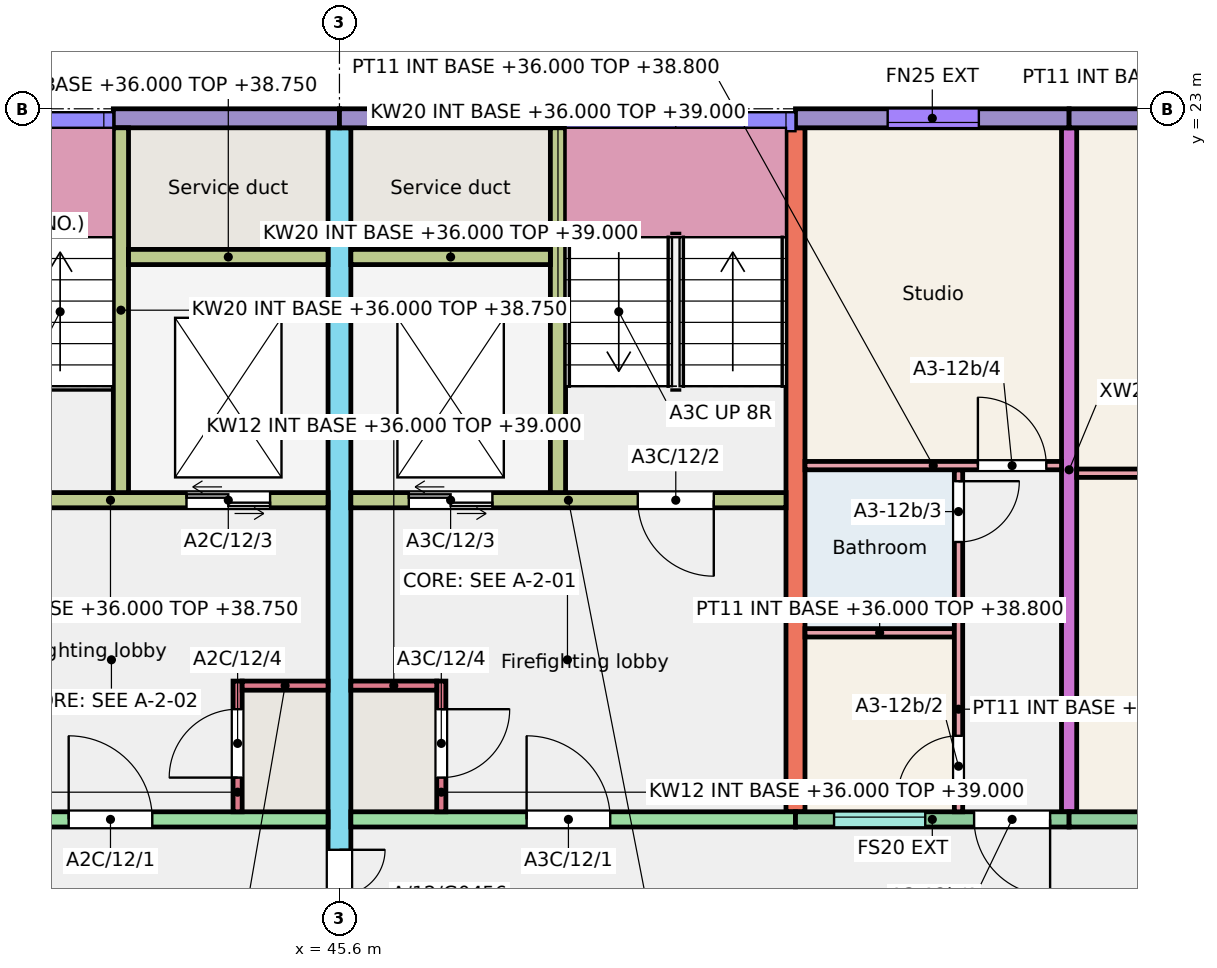
"""IFC4 building model, lengths in metres.
Left out: names, types, materials, properties, quantities, classifications, styles, units other than length and angle.
Written with IfcOpenShell. Run it as: python <this file> out.ifc"""

import sys

from ifc_helpers import new_model, si_unit, direction, frame, frame_2d, origin, place, context, subcontext, project, spatial, rectangle, extrude, element, fill, save


model = new_model("IFC4")
c1 = context("Model", 3, precision=1e-05, world=origin(), true_north=direction((0.0, 1.0)))
c2 = subcontext(c1, "Body", "Model", "MODEL_VIEW")
j1 = project(units=[si_unit("LENGTHUNIT", "METRE"), si_unit("PLANEANGLEUNIT", "RADIAN")], contexts=[c1])
p1 = place(None, origin())
s1 = spatial("IfcSite", under=j1, at=p1, CompositionType="ELEMENT")
p2 = place(p1, origin())
s2 = spatial("IfcBuilding", under=s1, at=p2, CompositionType="ELEMENT")
p3 = place(p2, frame((0.0, 0.0, 36.0)))
s3 = spatial("IfcBuildingStorey", under=s2, at=p3, CompositionType="ELEMENT", Elevation=36.0)
p4 = place(p3, frame((45.6, 11.75, 0.0), z_axis=(0.0, 0.0, 1.0), x_axis=(0.0, 1.0, 0.0)))
e1 = element("IfcWall", 1, at=p4, inside=s3, PredefinedType="SHEAR", context=c2, shape_type="SweptSolid", body=[
    extrude(rectangle(XDim=11.0, YDim=0.3, at=frame_2d((5.5, 0.0))), origin(), (0.0, 0.0, 1.0), 3.0),
])
p5 = place(p4, frame((0.3, 0.0, 0.0)))
e2 = element("IfcOpeningElement", 2, at=p5, cuts=e1, PredefinedType="OPENING", context=c2, shape_type="SweptSolid", body=[
    extrude(rectangle(XDim=1.2, YDim=2.1, at=frame_2d((0.6, 1.05))), frame((0.0, 0.16, 0.0), z_axis=(0.0, -1.0, 0.0), x_axis=(1.0, 0.0, 0.0)), (0.0, 0.0, 1.0), 0.32),
])
p6 = place(p3, frame((51.6, 13.75, 0.0), z_axis=(0.0, 0.0, 1.0), x_axis=(0.0, 1.0, 0.0)))
e3 = element("IfcWall", 3, at=p6, inside=s3, PredefinedType="SHEAR", context=c2, shape_type="SweptSolid", body=[
    extrude(rectangle(XDim=9.0, YDim=0.25, at=frame_2d((4.5, 0.0))), origin(), (0.0, 0.0, 1.0), 3.0),
])
p7 = place(p3, frame((55.2, 13.75, 0.0), z_axis=(0.0, 0.0, 1.0), x_axis=(0.0, 1.0, 0.0)))
e4 = element("IfcWall", 4, at=p7, inside=s3, PredefinedType="SHEAR", context=c2, shape_type="SweptSolid", body=[
    extrude(rectangle(XDim=9.0, YDim=0.2, at=frame_2d((4.5, 0.0))), origin(), (0.0, 0.0, 1.0), 3.0),
])
p8 = place(p3, frame((42.625, 22.875, 0.0), z_axis=(0.0, 0.0, 1.0), x_axis=(1.0, 0.0, 0.0)))
e5 = element("IfcWall", 5, at=p8, inside=s3, PredefinedType="SOLIDWALL", context=c2, shape_type="SweptSolid", body=[
    extrude(rectangle(XDim=2.975, YDim=0.25, at=frame_2d((1.488, 0.0))), origin(), (0.0, 0.0, 1.0), 3.0),
])
p9 = place(p3, frame((39.6, 13.65, 0.0), z_axis=(0.0, 0.0, 1.0), x_axis=(1.0, 0.0, 0.0)))
e6 = element("IfcWall", 6, at=p9, inside=s3, PredefinedType="SHEAR", context=c2, shape_type="SweptSolid", body=[
    extrude(rectangle(XDim=5.85, YDim=0.2, at=frame_2d((2.925, 0.0))), origin(), (0.0, 0.0, 1.0), 2.75),
])
p10 = place(p9, frame((2.438, 0.0, 0.0)))
e7 = element("IfcOpeningElement", 7, at=p10, cuts=e6, PredefinedType="OPENING", context=c2, shape_type="SweptSolid", body=[
    extrude(rectangle(XDim=1.1, YDim=2.1, at=frame_2d((0.55, 1.05))), frame((0.0, 0.11, 0.0), z_axis=(0.0, -1.0, 0.0), x_axis=(1.0, 0.0, 0.0)), (0.0, 0.0, 1.0), 0.22),
])
p11 = place(p3, frame((39.725, 17.85, 0.0), z_axis=(0.0, 0.0, 1.0), x_axis=(1.0, 0.0, 0.0)))
e8 = element("IfcWall", 8, at=p11, inside=s3, PredefinedType="SHEAR", context=c2, shape_type="SweptSolid", body=[
    extrude(rectangle(XDim=5.725, YDim=0.2, at=frame_2d((2.862, 0.0))), origin(), (0.0, 0.0, 1.0), 2.75),
])
p12 = place(p11, frame((0.95, 0.0, 0.0)))
e9 = element("IfcOpeningElement", 9, at=p12, cuts=e8, PredefinedType="OPENING", context=c2, shape_type="SweptSolid", body=[
    extrude(rectangle(XDim=1.0, YDim=2.1, at=frame_2d((0.5, 1.05))), frame((0.0, 0.11, 0.0), z_axis=(0.0, -1.0, 0.0), x_axis=(1.0, 0.0, 0.0)), (0.0, 0.0, 1.0), 0.22),
])
p13 = place(p11, frame((3.863, 0.0, 0.0)))
e10 = element("IfcOpeningElement", 10, at=p13, cuts=e8, PredefinedType="OPENING", context=c2, shape_type="SweptSolid", body=[
    extrude(rectangle(XDim=1.1, YDim=2.1, at=frame_2d((0.55, 1.05))), frame((0.0, 0.11, 0.0), z_axis=(0.0, -1.0, 0.0), x_axis=(1.0, 0.0, 0.0)), (0.0, 0.0, 1.0), 0.22),
])
p14 = place(p3, frame((42.725, 17.95, 0.0), z_axis=(0.0, 0.0, 1.0), x_axis=(0.0, 1.0, 0.0)))
e11 = element("IfcWall", 11, at=p14, inside=s3, PredefinedType="SHEAR", context=c2, shape_type="SweptSolid", body=[
    extrude(rectangle(XDim=4.8, YDim=0.2, at=frame_2d((2.4, 0.0))), origin(), (0.0, 0.0, 1.0), 2.75),
])
p15 = place(p3, frame((42.825, 21.05, 0.0), z_axis=(0.0, 0.0, 1.0), x_axis=(1.0, 0.0, 0.0)))
e12 = element("IfcWall", 12, at=p15, inside=s3, PredefinedType="SHEAR", context=c2, shape_type="SweptSolid", body=[
    extrude(rectangle(XDim=2.625, YDim=0.2, at=frame_2d((1.312, 0.0))), origin(), (0.0, 0.0, 1.0), 2.75),
])
p16 = place(p3, frame((44.26, 13.75, 0.0), z_axis=(0.0, 0.0, 1.0), x_axis=(0.0, 1.0, 0.0)))
e13 = element("IfcWall", 13, at=p16, inside=s3, PredefinedType="SHEAR", context=c2, shape_type="SweptSolid", body=[
    extrude(rectangle(XDim=1.72, YDim=0.12, at=frame_2d((0.86, 0.0))), origin(), (0.0, 0.0, 1.0), 2.75),
])
p17 = place(p16, frame((0.45, 0.0, 0.0)))
e14 = element("IfcOpeningElement", 14, at=p17, cuts=e13, PredefinedType="OPENING", context=c2, shape_type="SweptSolid", body=[
    extrude(rectangle(XDim=0.9, YDim=2.1, at=frame_2d((0.45, 1.05))), frame((0.0, 0.07, 0.0), z_axis=(0.0, -1.0, 0.0), x_axis=(1.0, 0.0, 0.0)), (0.0, 0.0, 1.0), 0.14),
])
p18 = place(p3, frame((44.32, 15.41, 0.0), z_axis=(0.0, 0.0, 1.0), x_axis=(1.0, 0.0, 0.0)))
e15 = element("IfcWall", 15, at=p18, inside=s3, PredefinedType="SHEAR", context=c2, shape_type="SweptSolid", body=[
    extrude(rectangle(XDim=1.13, YDim=0.12, at=frame_2d((0.565, 0.0))), origin(), (0.0, 0.0, 1.0), 2.75),
])
p19 = place(p3, frame((45.6, 22.875, 0.0), z_axis=(0.0, 0.0, 1.0), x_axis=(1.0, 0.0, 0.0)))
e16 = element("IfcWall", 16, at=p19, inside=s3, PredefinedType="SOLIDWALL", context=c2, shape_type="SweptSolid", body=[
    extrude(rectangle(XDim=2.975, YDim=0.25, at=frame_2d((1.487, 0.0))), origin(), (0.0, 0.0, 1.0), 3.0),
])
p20 = place(p3, frame((45.75, 13.65, 0.0), z_axis=(0.0, 0.0, 1.0), x_axis=(1.0, 0.0, 0.0)))
e17 = element("IfcWall", 17, at=p20, inside=s3, PredefinedType="SHEAR", context=c2, shape_type="SweptSolid", body=[
    extrude(rectangle(XDim=5.85, YDim=0.2, at=frame_2d((2.925, 0.0))), origin(), (0.0, 0.0, 1.0), 3.0),
])
p21 = place(p20, frame((2.312, 0.0, 0.0)))
e18 = element("IfcOpeningElement", 18, at=p21, cuts=e17, PredefinedType="OPENING", context=c2, shape_type="SweptSolid", body=[
    extrude(rectangle(XDim=1.1, YDim=2.1, at=frame_2d((0.55, 1.05))), frame((0.0, 0.11, 0.0), z_axis=(0.0, -1.0, 0.0), x_axis=(1.0, 0.0, 0.0)), (0.0, 0.0, 1.0), 0.22),
])
p22 = place(p3, frame((45.75, 17.85, 0.0), z_axis=(0.0, 0.0, 1.0), x_axis=(1.0, 0.0, 0.0)))
e19 = element("IfcWall", 19, at=p22, inside=s3, PredefinedType="SHEAR", context=c2, shape_type="SweptSolid", body=[
    extrude(rectangle(XDim=5.725, YDim=0.2, at=frame_2d((2.863, 0.0))), origin(), (0.0, 0.0, 1.0), 3.0),
])
p23 = place(p22, frame((3.775, 0.0, 0.0)))
e20 = element("IfcOpeningElement", 20, at=p23, cuts=e19, PredefinedType="OPENING", context=c2, shape_type="SweptSolid", body=[
    extrude(rectangle(XDim=1.0, YDim=2.1, at=frame_2d((0.5, 1.05))), frame((0.0, 0.11, 0.0), z_axis=(0.0, -1.0, 0.0), x_axis=(1.0, 0.0, 0.0)), (0.0, 0.0, 1.0), 0.22),
])
p24 = place(p22, frame((0.762, 0.0, 0.0)))
e21 = element("IfcOpeningElement", 21, at=p24, cuts=e19, PredefinedType="OPENING", context=c2, shape_type="SweptSolid", body=[
    extrude(rectangle(XDim=1.1, YDim=2.1, at=frame_2d((0.55, 1.05))), frame((0.0, 0.11, 0.0), z_axis=(0.0, -1.0, 0.0), x_axis=(1.0, 0.0, 0.0)), (0.0, 0.0, 1.0), 0.22),
])
p25 = place(p3, frame((48.475, 17.95, 0.0), z_axis=(0.0, 0.0, 1.0), x_axis=(0.0, 1.0, 0.0)))
e22 = element("IfcWall", 22, at=p25, inside=s3, PredefinedType="SHEAR", context=c2, shape_type="SweptSolid", body=[
    extrude(rectangle(XDim=4.8, YDim=0.2, at=frame_2d((2.4, 0.0))), origin(), (0.0, 0.0, 1.0), 3.0),
])
p26 = place(p3, frame((45.75, 21.05, 0.0), z_axis=(0.0, 0.0, 1.0), x_axis=(1.0, 0.0, 0.0)))
e23 = element("IfcWall", 23, at=p26, inside=s3, PredefinedType="SHEAR", context=c2, shape_type="SweptSolid", body=[
    extrude(rectangle(XDim=2.625, YDim=0.2, at=frame_2d((1.312, 0.0))), origin(), (0.0, 0.0, 1.0), 3.0),
])
p27 = place(p3, frame((46.94, 13.75, 0.0), z_axis=(0.0, 0.0, 1.0), x_axis=(0.0, 1.0, 0.0)))
e24 = element("IfcWall", 24, at=p27, inside=s3, PredefinedType="SHEAR", context=c2, shape_type="SweptSolid", body=[
    extrude(rectangle(XDim=1.72, YDim=0.12, at=frame_2d((0.86, 0.0))), origin(), (0.0, 0.0, 1.0), 3.0),
])
p28 = place(p27, frame((0.45, 0.0, 0.0)))
e25 = element("IfcOpeningElement", 25, at=p28, cuts=e24, PredefinedType="OPENING", context=c2, shape_type="SweptSolid", body=[
    extrude(rectangle(XDim=0.9, YDim=2.1, at=frame_2d((0.45, 1.05))), frame((0.0, 0.07, 0.0), z_axis=(0.0, -1.0, 0.0), x_axis=(1.0, 0.0, 0.0)), (0.0, 0.0, 1.0), 0.14),
])
p29 = place(p3, frame((45.75, 15.41, 0.0), z_axis=(0.0, 0.0, 1.0), x_axis=(1.0, 0.0, 0.0)))
e26 = element("IfcWall", 26, at=p29, inside=s3, PredefinedType="SHEAR", context=c2, shape_type="SweptSolid", body=[
    extrude(rectangle(XDim=1.13, YDim=0.12, at=frame_2d((0.565, 0.0))), origin(), (0.0, 0.0, 1.0), 3.0),
])
p30 = place(p3, frame((51.6, 22.875, 0.0), z_axis=(0.0, 0.0, 1.0), x_axis=(1.0, 0.0, 0.0)))
e27 = element("IfcWall", 27, at=p30, inside=s3, PredefinedType="SOLIDWALL", context=c2, shape_type="SweptSolid", body=[
    extrude(rectangle(XDim=3.6, YDim=0.25, at=frame_2d((1.8, 0.0))), origin(), (0.0, 0.0, 1.0), 3.0),
])
p31 = place(p30, frame((1.212, 0.0, 0.8)))
e28 = element("IfcOpeningElement", 28, at=p31, cuts=e27, PredefinedType="OPENING", context=c2, shape_type="SweptSolid", body=[
    extrude(rectangle(XDim=1.2, YDim=1.6, at=frame_2d((0.6, 0.8))), frame((0.0, 0.135, 0.0), z_axis=(0.0, -1.0, 0.0), x_axis=(1.0, 0.0, 0.0)), (0.0, 0.0, 1.0), 0.27),
])
p32 = place(p3, frame((51.6, 13.65, 0.0), z_axis=(0.0, 0.0, 1.0), x_axis=(1.0, 0.0, 0.0)))
e29 = element("IfcWall", 29, at=p32, inside=s3, PredefinedType="SOLIDWALL", context=c2, shape_type="SweptSolid", body=[
    extrude(rectangle(XDim=3.6, YDim=0.2, at=frame_2d((1.8, 0.0))), origin(), (0.0, 0.0, 1.0), 3.0),
])
p33 = place(p32, frame((0.508, 0.0, 1.1)))
e30 = element("IfcOpeningElement", 30, at=p33, cuts=e29, PredefinedType="OPENING", context=c2, shape_type="SweptSolid", body=[
    extrude(rectangle(XDim=1.2, YDim=1.3, at=frame_2d((0.6, 0.65))), frame((0.0, 0.11, 0.0), z_axis=(0.0, -1.0, 0.0), x_axis=(1.0, 0.0, 0.0)), (0.0, 0.0, 1.0), 0.22),
])
p34 = place(p32, frame((2.35, 0.0, 0.0)))
e31 = element("IfcOpeningElement", 31, at=p34, cuts=e29, PredefinedType="OPENING", context=c2, shape_type="SweptSolid", body=[
    extrude(rectangle(XDim=1.0, YDim=2.1, at=frame_2d((0.5, 1.05))), frame((0.0, 0.11, 0.0), z_axis=(0.0, -1.0, 0.0), x_axis=(1.0, 0.0, 0.0)), (0.0, 0.0, 1.0), 0.22),
])
p35 = place(p3, frame((55.2, 22.875, 0.0), z_axis=(0.0, 0.0, 1.0), x_axis=(1.0, 0.0, 0.0)))
e32 = element("IfcWall", 32, at=p35, inside=s3, PredefinedType="SOLIDWALL", context=c2, shape_type="SweptSolid", body=[
    extrude(rectangle(XDim=3.6, YDim=0.25, at=frame_2d((1.8, 0.0))), origin(), (0.0, 0.0, 1.0), 3.0),
])
p36 = place(p35, frame((1.2, 0.0, 0.8)))
e33 = element("IfcOpeningElement", 33, at=p36, cuts=e32, PredefinedType="OPENING", context=c2, shape_type="SweptSolid", body=[
    extrude(rectangle(XDim=1.2, YDim=1.6, at=frame_2d((0.6, 0.8))), frame((0.0, 0.135, 0.0), z_axis=(0.0, -1.0, 0.0), x_axis=(1.0, 0.0, 0.0)), (0.0, 0.0, 1.0), 0.27),
])
p37 = place(p3, frame((55.2, 13.65, 0.0), z_axis=(0.0, 0.0, 1.0), x_axis=(1.0, 0.0, 0.0)))
e34 = element("IfcWall", 34, at=p37, inside=s3, PredefinedType="SOLIDWALL", context=c2, shape_type="SweptSolid", body=[
    extrude(rectangle(XDim=3.6, YDim=0.2, at=frame_2d((1.8, 0.0))), origin(), (0.0, 0.0, 1.0), 3.0),
])
p38 = place(p37, frame((1.2, 0.0, 0.8)))
e35 = element("IfcOpeningElement", 35, at=p38, cuts=e34, PredefinedType="OPENING", context=c2, shape_type="SweptSolid", body=[
    extrude(rectangle(XDim=1.2, YDim=1.6, at=frame_2d((0.6, 0.8))), frame((0.0, 0.11, 0.0), z_axis=(0.0, -1.0, 0.0), x_axis=(1.0, 0.0, 0.0)), (0.0, 0.0, 1.0), 0.22),
])
p39 = place(p3, frame((55.3, 18.205, 0.0), z_axis=(0.0, 0.0, 1.0), x_axis=(1.0, 0.0, 0.0)))
e36 = element("IfcWall", 36, at=p39, inside=s3, PredefinedType="PARTITIONING", context=c2, shape_type="SweptSolid", body=[
    extrude(rectangle(XDim=3.4, YDim=0.11, at=frame_2d((1.7, 0.0))), origin(), (0.0, 0.0, 1.0), 2.8),
])
p40 = place(p3, frame((51.725, 16.105, 0.0), z_axis=(0.0, 0.0, 1.0), x_axis=(1.0, 0.0, 0.0)))
e37 = element("IfcWall", 37, at=p40, inside=s3, PredefinedType="PARTITIONING", context=c2, shape_type="SweptSolid", body=[
    extrude(rectangle(XDim=1.965, YDim=0.11, at=frame_2d((0.982, 0.0))), origin(), (0.0, 0.0, 1.0), 2.8),
])
p41 = place(p3, frame((53.745, 13.75, 0.0), z_axis=(0.0, 0.0, 1.0), x_axis=(0.0, 1.0, 0.0)))
e38 = element("IfcWall", 38, at=p41, inside=s3, PredefinedType="PARTITIONING", context=c2, shape_type="SweptSolid", body=[
    extrude(rectangle(XDim=4.5, YDim=0.11, at=frame_2d((2.25, 0.0))), origin(), (0.0, 0.0, 1.0), 2.8),
])
p42 = place(p41, frame((0.2, 0.0, 0.0)))
e39 = element("IfcOpeningElement", 39, at=p42, cuts=e38, PredefinedType="OPENING", context=c2, shape_type="SweptSolid", body=[
    extrude(rectangle(XDim=0.8, YDim=2.1, at=frame_2d((0.4, 1.05))), frame((0.0, 0.065, 0.0), z_axis=(0.0, -1.0, 0.0), x_axis=(1.0, 0.0, 0.0)), (0.0, 0.0, 1.0), 0.13),
])
p43 = place(p41, frame((3.55, 0.0, 0.0)))
e40 = element("IfcOpeningElement", 40, at=p43, cuts=e38, PredefinedType="OPENING", context=c2, shape_type="SweptSolid", body=[
    extrude(rectangle(XDim=0.8, YDim=2.1, at=frame_2d((0.4, 1.05))), frame((0.0, 0.065, 0.0), z_axis=(0.0, -1.0, 0.0), x_axis=(1.0, 0.0, 0.0)), (0.0, 0.0, 1.0), 0.13),
])
p44 = place(p3, frame((51.725, 18.305, 0.0), z_axis=(0.0, 0.0, 1.0), x_axis=(1.0, 0.0, 0.0)))
e41 = element("IfcWall", 41, at=p44, inside=s3, PredefinedType="PARTITIONING", context=c2, shape_type="SweptSolid", body=[
    extrude(rectangle(XDim=3.375, YDim=0.11, at=frame_2d((1.688, 0.0))), origin(), (0.0, 0.0, 1.0), 2.8),
])
p45 = place(p44, frame((2.275, 0.0, 0.0)))
e42 = element("IfcOpeningElement", 42, at=p45, cuts=e41, PredefinedType="OPENING", context=c2, shape_type="SweptSolid", body=[
    extrude(rectangle(XDim=0.9, YDim=2.1, at=frame_2d((0.45, 1.05))), frame((0.0, 0.065, 0.0), z_axis=(0.0, -1.0, 0.0), x_axis=(1.0, 0.0, 0.0)), (0.0, 0.0, 1.0), 0.13),
])
p46 = place(p33, origin())
e43 = element("IfcWindow", 43, at=p46, inside=s3, PartitioningType="SINGLE_PANEL", PredefinedType="WINDOW", context=c2, shape_type="SweptSolid", body=[
    extrude(rectangle(XDim=1.2, YDim=1.3, at=frame_2d((0.6, 0.65))), frame((0.0, 0.06, 0.0), z_axis=(0.0, -1.0, 0.0), x_axis=(1.0, 0.0, 0.0)), (0.0, 0.0, 1.0), 0.06),
])
fill(e30, e43)
p47 = place(p31, origin())
e44 = element("IfcWindow", 44, at=p47, inside=s3, PartitioningType="SINGLE_PANEL", PredefinedType="WINDOW", context=c2, shape_type="SweptSolid", body=[
    extrude(rectangle(XDim=1.2, YDim=1.6, at=frame_2d((0.6, 0.8))), frame((0.0, -0.025, 0.0), z_axis=(0.0, -1.0, 0.0), x_axis=(1.0, 0.0, 0.0)), (0.0, 0.0, 1.0), 0.06),
])
fill(e28, e44)
p48 = place(p34, origin())
e45 = element("IfcDoor", 45, at=p48, inside=s3, OperationType="SINGLE_SWING_RIGHT", PredefinedType="DOOR", context=c2, shape_type="SweptSolid", body=[
    extrude(rectangle(XDim=1.0, YDim=2.1, at=frame_2d((0.5, 1.05))), frame((0.0, 0.025, 0.0), z_axis=(0.0, -1.0, 0.0), x_axis=(1.0, 0.0, 0.0)), (0.0, 0.0, 1.0), 0.05),
])
fill(e31, e45)
p49 = place(p42, origin())
e46 = element("IfcDoor", 46, at=p49, inside=s3, OperationType="SINGLE_SWING_LEFT", PredefinedType="DOOR", context=c2, shape_type="SweptSolid", body=[
    extrude(rectangle(XDim=0.8, YDim=2.1, at=frame_2d((0.4, 1.05))), frame((0.0, 0.025, 0.0), z_axis=(0.0, -1.0, 0.0), x_axis=(1.0, 0.0, 0.0)), (0.0, 0.0, 1.0), 0.05),
])
fill(e39, e46)
p50 = place(p43, origin())
e47 = element("IfcDoor", 47, at=p50, inside=s3, OperationType="SINGLE_SWING_RIGHT", PredefinedType="DOOR", context=c2, shape_type="SweptSolid", body=[
    extrude(rectangle(XDim=0.8, YDim=2.1, at=frame_2d((0.4, 1.05))), frame((0.0, 0.025, 0.0), z_axis=(0.0, -1.0, 0.0), x_axis=(1.0, 0.0, 0.0)), (0.0, 0.0, 1.0), 0.05),
])
fill(e40, e47)
p51 = place(p45, origin())
e48 = element("IfcDoor", 48, at=p51, inside=s3, OperationType="SINGLE_SWING_LEFT", PredefinedType="DOOR", context=c2, shape_type="SweptSolid", body=[
    extrude(rectangle(XDim=0.9, YDim=2.1, at=frame_2d((0.45, 1.05))), frame((0.0, 0.025, 0.0), z_axis=(0.0, -1.0, 0.0), x_axis=(1.0, 0.0, 0.0)), (0.0, 0.0, 1.0), 0.05),
])
fill(e42, e48)
p52 = place(p10, origin())
e49 = element("IfcDoor", 49, at=p52, inside=s3, OperationType="SINGLE_SWING_LEFT", PredefinedType="DOOR", context=c2, shape_type="SweptSolid", body=[
    extrude(rectangle(XDim=1.1, YDim=2.1, at=frame_2d((0.55, 1.05))), frame((0.0, 0.025, 0.0), z_axis=(0.0, -1.0, 0.0), x_axis=(1.0, 0.0, 0.0)), (0.0, 0.0, 1.0), 0.05),
])
fill(e7, e49)
p53 = place(p13, origin())
e50 = element("IfcDoor", 50, at=p53, inside=s3, OperationType="DOUBLE_DOOR_SLIDING", PredefinedType="DOOR", context=c2, shape_type="SweptSolid", body=[
    extrude(rectangle(XDim=1.1, YDim=2.1, at=frame_2d((0.55, 1.05))), frame((0.0, 0.025, 0.0), z_axis=(0.0, -1.0, 0.0), x_axis=(1.0, 0.0, 0.0)), (0.0, 0.0, 1.0), 0.05),
])
fill(e10, e50)
p54 = place(p17, origin())
e51 = element("IfcDoor", 51, at=p54, inside=s3, OperationType="SINGLE_SWING_LEFT", PredefinedType="DOOR", context=c2, shape_type="SweptSolid", body=[
    extrude(rectangle(XDim=0.9, YDim=2.1, at=frame_2d((0.45, 1.05))), frame((0.0, 0.025, 0.0), z_axis=(0.0, -1.0, 0.0), x_axis=(1.0, 0.0, 0.0)), (0.0, 0.0, 1.0), 0.05),
])
fill(e14, e51)
p55 = place(p21, origin())
e52 = element("IfcDoor", 52, at=p55, inside=s3, OperationType="SINGLE_SWING_LEFT", PredefinedType="DOOR", context=c2, shape_type="SweptSolid", body=[
    extrude(rectangle(XDim=1.1, YDim=2.1, at=frame_2d((0.55, 1.05))), frame((0.0, 0.025, 0.0), z_axis=(0.0, -1.0, 0.0), x_axis=(1.0, 0.0, 0.0)), (0.0, 0.0, 1.0), 0.05),
])
fill(e18, e52)
p56 = place(p23, origin())
e53 = element("IfcDoor", 53, at=p56, inside=s3, OperationType="SINGLE_SWING_RIGHT", PredefinedType="DOOR", context=c2, shape_type="SweptSolid", body=[
    extrude(rectangle(XDim=1.0, YDim=2.1, at=frame_2d((0.5, 1.05))), frame((0.0, 0.025, 0.0), z_axis=(0.0, -1.0, 0.0), x_axis=(1.0, 0.0, 0.0)), (0.0, 0.0, 1.0), 0.05),
])
fill(e20, e53)
p57 = place(p24, origin())
e54 = element("IfcDoor", 54, at=p57, inside=s3, OperationType="DOUBLE_DOOR_SLIDING", PredefinedType="DOOR", context=c2, shape_type="SweptSolid", body=[
    extrude(rectangle(XDim=1.1, YDim=2.1, at=frame_2d((0.55, 1.05))), frame((0.0, 0.025, 0.0), z_axis=(0.0, -1.0, 0.0), x_axis=(1.0, 0.0, 0.0)), (0.0, 0.0, 1.0), 0.05),
])
fill(e21, e54)
p58 = place(p28, origin())
e55 = element("IfcDoor", 55, at=p58, inside=s3, OperationType="SINGLE_SWING_RIGHT", PredefinedType="DOOR", context=c2, shape_type="SweptSolid", body=[
    extrude(rectangle(XDim=0.9, YDim=2.1, at=frame_2d((0.45, 1.05))), frame((0.0, 0.025, 0.0), z_axis=(0.0, -1.0, 0.0), x_axis=(1.0, 0.0, 0.0)), (0.0, 0.0, 1.0), 0.05),
])
fill(e25, e55)
p59 = place(p5, origin())
e56 = element("IfcDoor", 56, at=p59, inside=s3, OperationType="DOUBLE_DOOR_SINGLE_SWING", PredefinedType="DOOR", context=c2, shape_type="SweptSolid", body=[
    extrude(rectangle(XDim=1.2, YDim=2.1, at=frame_2d((0.6, 1.05))), frame((0.0, 0.025, 0.0), z_axis=(0.0, -1.0, 0.0), x_axis=(1.0, 0.0, 0.0)), (0.0, 0.0, 1.0), 0.05),
])
fill(e2, e56)
save(model, sys.argv[1])
